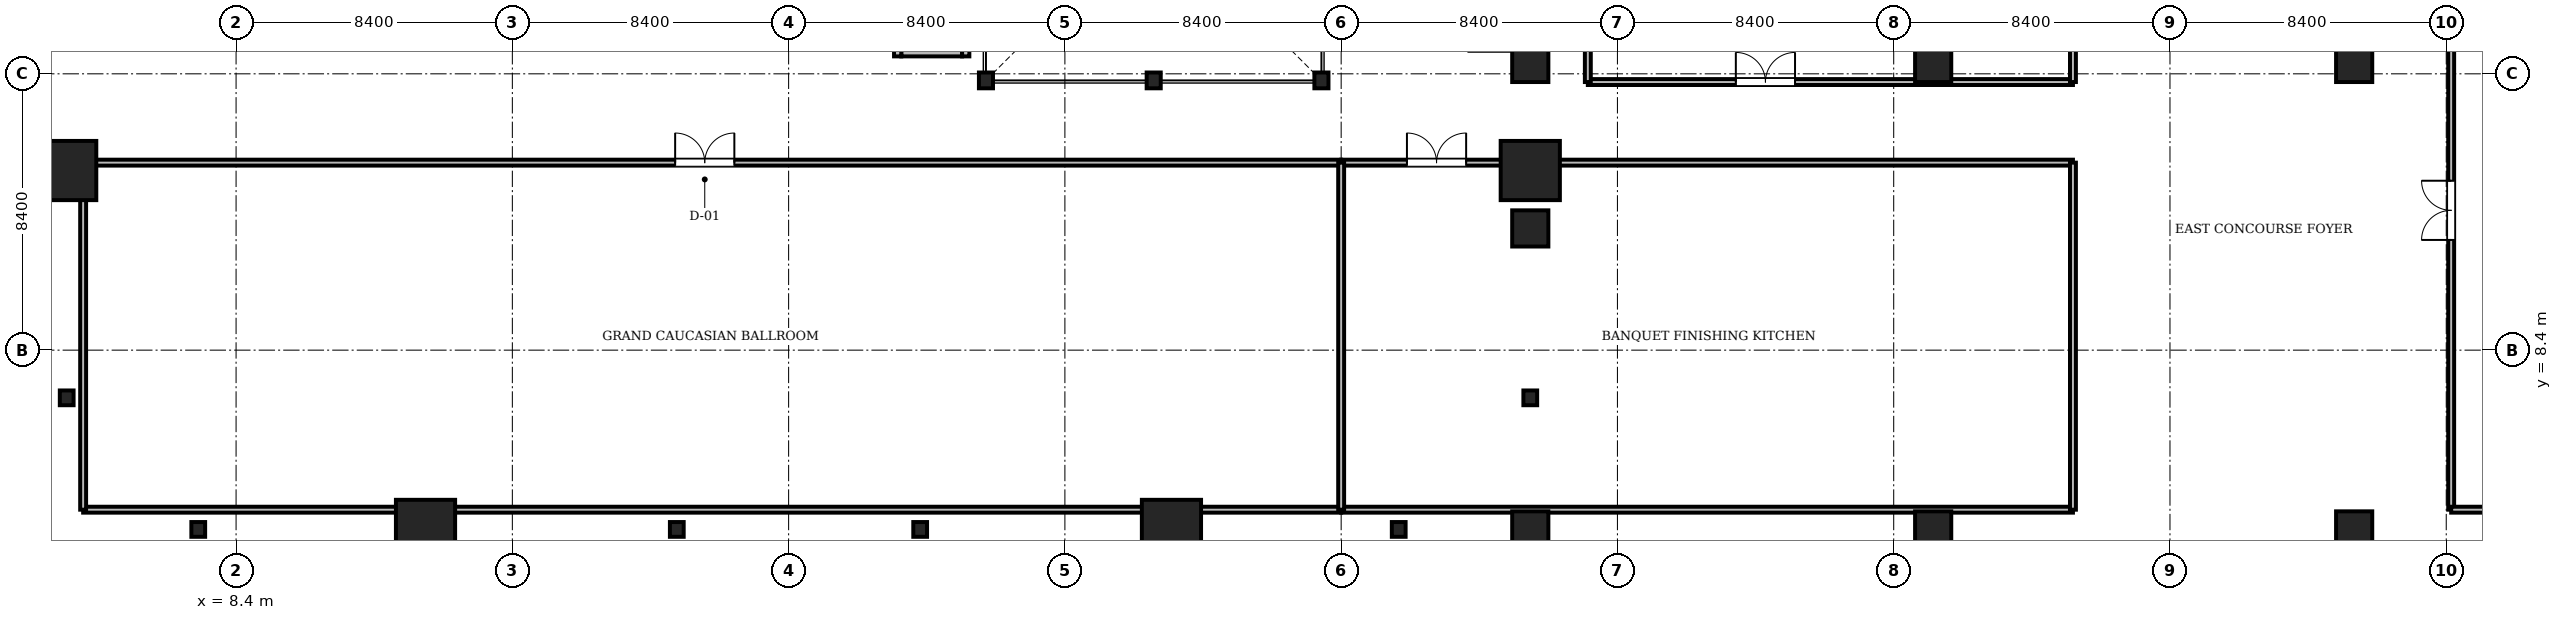
"""IFC4 building model, lengths in metres.
Left out: names, types, materials, properties, quantities, classifications, styles, units other than length and angle.
Written with IfcOpenShell. Run it as: python <this file> out.ifc"""

import sys

from ifc_helpers import new_model, si_unit, direction, frame, frame_2d, origin, origin_2d, place, context, subcontext, project, spatial, rectangle, i_section, extrude, source, transform, mapped, element, fill, save


model = new_model("IFC4")
c1 = context("Model", 3, precision=1e-05, world=origin(), true_north=direction((0.0, 1.0)))
c2 = subcontext(c1, "Body", "Model", "MODEL_VIEW")
j1 = project(units=[si_unit("LENGTHUNIT", "METRE"), si_unit("PLANEANGLEUNIT", "RADIAN")], contexts=[c1])
p1 = place(None, origin())
s1 = spatial("IfcSite", under=j1, at=p1, CompositionType="ELEMENT")
p2 = place(p1, origin())
s2 = spatial("IfcBuilding", under=s1, at=p2, CompositionType="ELEMENT")
p3 = place(p2, frame((0.0, 0.0, 17.0)))
s3 = spatial("IfcBuildingStorey", under=s2, at=p3, CompositionType="ELEMENT", Elevation=17.0)
m1 = source(origin(), c2, "Body", "SweptSolid", [
    extrude(i_section(OverallWidth=0.428, OverallDepth=0.481, WebThickness=0.04, FlangeThickness=0.063, FilletRadius=0.015, at=origin_2d()), origin(), (0.0, 0.0, 1.0), 5.08),
])
for number, where, z_axis, x_axis in (
    (1, (31.2, 16.6, 0.0), (0.0, 0.0, 1.0), (1.0, 0.0, 0.0)),
    (2, (36.3, 16.6, 0.0), (0.0, 0.0, 1.0), (1.0, 0.0, 0.0)),
    (3, (41.4, 16.6, 0.0), (0.0, 0.0, 1.0), (1.0, 0.0, 0.0)),
):
    element("IfcColumn", number, at=place(p3, frame(where, z_axis=z_axis, x_axis=x_axis)), inside=s3, PredefinedType="COLUMN", context=c2, shape_type="MappedRepresentation", body=[
        mapped(m1, transform((0.0, 0.0, 0.0), scale=1.0)),
    ])
m2 = source(origin(), c2, "Body", "SweptSolid", [
    extrude(rectangle(XDim=1.1, YDim=1.1, at=origin_2d()), origin(), (0.0, 0.0, 1.0), 5.08),
])
for number, where, z_axis, x_axis in (
    (4, (47.75, 2.95, 0.0), (0.0, 0.0, 1.0), (1.0, 0.0, 0.0)),
    (5, (60.0, 2.95, 0.0), (0.0, 0.0, 1.0), (1.0, 0.0, 0.0)),
    (6, (72.8, 2.95, 0.0), (0.0, 0.0, 1.0), (1.0, 0.0, 0.0)),
    (7, (47.75, 12.1, 0.0), (0.0, 0.0, 1.0), (1.0, 0.0, 0.0)),
    (8, (47.75, 17.1, 0.0), (0.0, 0.0, 1.0), (1.0, 0.0, 0.0)),
    (9, (60.0, 17.1, 0.0), (0.0, 0.0, 1.0), (1.0, 0.0, 0.0)),
    (10, (72.8, 17.1, 0.0), (0.0, 0.0, 1.0), (1.0, 0.0, 0.0)),
):
    element("IfcColumn", number, at=place(p3, frame(where, z_axis=z_axis, x_axis=x_axis)), inside=s3, PredefinedType="COLUMN", context=c2, shape_type="MappedRepresentation", body=[
        mapped(m2, transform((0.0, 0.0, 0.0), scale=1.0)),
    ])
m3 = source(origin(), c2, "Body", "SweptSolid", [
    extrude(rectangle(XDim=1.8, YDim=1.8, at=origin_2d()), origin(), (0.0, 0.0, 1.0), 5.08),
])
for number, where, z_axis, x_axis in (
    (11, (14.16, 2.95, 0.0), (0.0, 0.0, 1.0), (1.0, 0.0, 0.0)),
    (12, (36.84, 2.95, 0.0), (0.0, 0.0, 1.0), (1.0, 0.0, 0.0)),
    (13, (47.75, 13.86, 0.0), (0.0, 0.0, 1.0), (1.0, 0.0, 0.0)),
    (14, (3.25, 13.86, 0.0), (0.0, 0.0, 1.0), (1.0, 0.0, 0.0)),
):
    element("IfcColumn", number, at=place(p3, frame(where, z_axis=z_axis, x_axis=x_axis)), inside=s3, PredefinedType="COLUMN", context=c2, shape_type="MappedRepresentation", body=[
        mapped(m3, transform((0.0, 0.0, 0.0), scale=1.0)),
    ])
m4 = source(origin(), c2, "Body", "SweptSolid", [
    extrude(i_section(OverallWidth=0.419, OverallDepth=0.449, WebThickness=0.031, FlangeThickness=0.048, FilletRadius=0.015, at=origin_2d()), origin(), (0.0, 0.0, 1.0), 5.08),
])
for number, where, z_axis, x_axis in (
    (15, (7.25, 2.95, 0.0), (0.0, 0.0, 1.0), (1.0, 0.0, 0.0)),
    (16, (21.8, 2.95, 0.0), (0.0, 0.0, 1.0), (1.0, 0.0, 0.0)),
    (17, (29.2, 2.95, 0.0), (0.0, 0.0, 1.0), (1.0, 0.0, 0.0)),
    (18, (43.75, 2.95, 0.0), (0.0, 0.0, 1.0), (1.0, 0.0, 0.0)),
    (19, (47.75, 6.95, 0.0), (0.0, 0.0, 1.0), (1.0, 0.0, 0.0)),
    (20, (3.25, 6.95, 0.0), (0.0, 0.0, 1.0), (1.0, 0.0, 0.0)),
):
    element("IfcColumn", number, at=place(p3, frame(where, z_axis=z_axis, x_axis=x_axis)), inside=s3, PredefinedType="COLUMN", context=c2, shape_type="MappedRepresentation", body=[
        mapped(m4, transform((0.0, 0.0, 0.0), scale=1.0)),
    ])
m5 = source(origin(), c2, "Body", "SweptSolid", [
    extrude(rectangle(XDim=1.85, YDim=0.22, at=frame_2d((0.925, 0.0))), origin(), (0.0, 0.0, 1.0), 5.08),
])
p4 = place(p3, frame((28.625, 17.44, 0.0), z_axis=(0.0, 0.0, 1.0), x_axis=(1.0, 0.0, 0.0)))
e21 = element("IfcWall", 21, at=p4, inside=s3, PredefinedType="SOLIDWALL", context=c2, shape_type="MappedRepresentation", body=[
    mapped(m5, transform((0.0, 0.0, 0.0), scale=1.0)),
])
m6 = source(origin(), c2, "Body", "SweptSolid", [
    extrude(rectangle(XDim=2.54, YDim=0.22, at=frame_2d((1.27, 0.0))), origin(), (0.0, 0.0, 1.0), 5.08),
])
for number, where, z_axis, x_axis in (
    (22, (28.515, 17.33, 0.0), (0.0, 0.0, 1.0), (0.0, 1.0, 0.0)),
    (23, (30.585, 17.33, 0.0), (0.0, 0.0, 1.0), (0.0, 1.0, 0.0)),
):
    element("IfcWall", number, at=place(p3, frame(where, z_axis=z_axis, x_axis=x_axis)), inside=s3, PredefinedType="SOLIDWALL", context=c2, shape_type="MappedRepresentation", body=[
        mapped(m6, transform((0.0, 0.0, 0.0), scale=1.0)),
    ])
m7 = source(origin(), c2, "Body", "SweptSolid", [
    extrude(rectangle(XDim=38.25, YDim=0.18, at=frame_2d((19.125, 0.0))), origin(), (0.0, 0.0, 1.0), 5.08),
])
p5 = place(p3, frame((3.75, 14.1, 0.0), z_axis=(0.0, 0.0, 1.0), x_axis=(1.0, 0.0, 0.0)))
e24 = element("IfcWall", 24, at=p5, inside=s3, PredefinedType="PARTITIONING", context=c2, shape_type="MappedRepresentation", body=[
    mapped(m7, transform((0.0, 0.0, 0.0), scale=1.0)),
])
m8 = source(origin(), c2, "Body", "SweptSolid", [
    extrude(rectangle(XDim=1.8, YDim=2.4, at=frame_2d((0.9, 1.2))), frame((0.0, 0.1, 0.0), z_axis=(0.0, -1.0, 0.0), x_axis=(1.0, 0.0, 0.0)), (0.0, 0.0, 1.0), 0.2),
])
p6 = place(p5, frame((18.0, 0.0, 0.0)))
e25 = element("IfcOpeningElement", 25, at=p6, cuts=e24, PredefinedType="OPENING", context=c2, shape_type="MappedRepresentation", body=[
    mapped(m8, transform((0.0, 0.0, 0.0), scale=1.0)),
])
m9 = source(origin(), c2, "Body", "SweptSolid", [
    extrude(rectangle(XDim=25.7, YDim=0.18, at=frame_2d((12.85, 0.0))), origin(), (0.0, 0.0, 1.0), 4.548),
])
p7 = place(p3, frame((75.75, 3.55, 0.0), z_axis=(0.0, 0.0, 1.0), x_axis=(0.0, 1.0, 0.0)))
e26 = element("IfcWall", 26, at=p7, inside=s3, PredefinedType="PARTITIONING", context=c2, shape_type="MappedRepresentation", body=[
    mapped(m9, transform((0.0, 0.0, 0.0), scale=1.0)),
])
p8 = place(p7, frame((8.2, 0.0, 0.0)))
e27 = element("IfcOpeningElement", 27, at=p8, cuts=e26, PredefinedType="OPENING", context=c2, shape_type="MappedRepresentation", body=[
    mapped(m8, transform((0.0, 0.0, 0.0), scale=1.0)),
])
m10 = source(origin(), c2, "Body", "SweptSolid", [
    extrude(rectangle(XDim=22.25, YDim=0.18, at=frame_2d((11.125, 0.0))), origin(), (0.0, 0.0, 1.0), 4.472),
])
p9 = place(p3, frame((42.0, 14.1, 0.0), z_axis=(0.0, 0.0, 1.0), x_axis=(1.0, 0.0, 0.0)))
e28 = element("IfcWall", 28, at=p9, inside=s3, PredefinedType="PARTITIONING", context=c2, shape_type="MappedRepresentation", body=[
    mapped(m10, transform((0.0, 0.0, 0.0), scale=1.0)),
])
p10 = place(p9, frame((2.0, 0.0, 0.0)))
e29 = element("IfcOpeningElement", 29, at=p10, cuts=e28, PredefinedType="OPENING", context=c2, shape_type="MappedRepresentation", body=[
    mapped(m8, transform((0.0, 0.0, 0.0), scale=1.0)),
])
m11 = source(origin(), c2, "Body", "SweptSolid", [
    extrude(rectangle(XDim=14.75, YDim=0.18, at=frame_2d((7.375, 0.0))), origin(), (0.0, 0.0, 1.0), 4.472),
])
p11 = place(p3, frame((49.5, 16.55, 0.0), z_axis=(0.0, 0.0, 1.0), x_axis=(1.0, 0.0, 0.0)))
e30 = element("IfcWall", 30, at=p11, inside=s3, PredefinedType="PARTITIONING", context=c2, shape_type="MappedRepresentation", body=[
    mapped(m11, transform((0.0, 0.0, 0.0), scale=1.0)),
])
p12 = place(p11, frame((4.5, 0.0, 0.0)))
e31 = element("IfcOpeningElement", 31, at=p12, cuts=e30, PredefinedType="OPENING", context=c2, shape_type="MappedRepresentation", body=[
    mapped(m8, transform((0.0, 0.0, 0.0), scale=1.0)),
])
p13 = place(p3, frame((3.75, 3.55, 0.0), z_axis=(0.0, 0.0, 1.0), x_axis=(1.0, 0.0, 0.0)))
e32 = element("IfcWall", 32, at=p13, inside=s3, PredefinedType="PARTITIONING", context=c2, shape_type="MappedRepresentation", body=[
    mapped(m7, transform((0.0, 0.0, 0.0), scale=1.0)),
])
p14 = place(p3, frame((42.0, 3.55, 0.0), z_axis=(0.0, 0.0, 1.0), x_axis=(1.0, 0.0, 0.0)))
e33 = element("IfcWall", 33, at=p14, inside=s3, PredefinedType="PARTITIONING", context=c2, shape_type="MappedRepresentation", body=[
    mapped(m10, transform((0.0, 0.0, 0.0), scale=1.0)),
])
m12 = source(origin(), c2, "Body", "SweptSolid", [
    extrude(rectangle(XDim=11.75, YDim=0.18, at=frame_2d((5.875, 0.0))), origin(), (0.0, 0.0, 1.0), 4.548),
])
for number, where, z_axis, x_axis in (
    (34, (49.5, 16.55, 0.0), (0.0, 0.0, 1.0), (0.0, 1.0, 0.0)),
    (35, (64.25, 16.55, 0.0), (0.0, 0.0, 1.0), (0.0, 1.0, 0.0)),
):
    element("IfcWall", number, at=place(p3, frame(where, z_axis=z_axis, x_axis=x_axis)), inside=s3, PredefinedType="PARTITIONING", context=c2, shape_type="MappedRepresentation", body=[
        mapped(m12, transform((0.0, 0.0, 0.0), scale=1.0)),
    ])
m13 = source(origin(), c2, "Body", "SweptSolid", [
    extrude(rectangle(XDim=10.55, YDim=0.18, at=frame_2d((5.275, 0.0))), origin(), (0.0, 0.0, 1.0), 5.08),
])
for number, where, z_axis, x_axis in (
    (36, (3.75, 3.55, 0.0), (0.0, 0.0, 1.0), (0.0, 1.0, 0.0)),
    (37, (42.0, 3.55, 0.0), (0.0, 0.0, 1.0), (0.0, 1.0, 0.0)),
):
    element("IfcWall", number, at=place(p3, frame(where, z_axis=z_axis, x_axis=x_axis)), inside=s3, PredefinedType="PARTITIONING", context=c2, shape_type="MappedRepresentation", body=[
        mapped(m13, transform((0.0, 0.0, 0.0), scale=1.0)),
    ])
m14 = source(origin(), c2, "Body", "SweptSolid", [
    extrude(rectangle(XDim=10.55, YDim=0.18, at=frame_2d((5.275, 0.0))), origin(), (0.0, 0.0, 1.0), 4.672),
])
p15 = place(p3, frame((64.25, 3.55, 0.0), z_axis=(0.0, 0.0, 1.0), x_axis=(0.0, 1.0, 0.0)))
e38 = element("IfcWall", 38, at=p15, inside=s3, PredefinedType="PARTITIONING", context=c2, shape_type="MappedRepresentation", body=[
    mapped(m14, transform((0.0, 0.0, 0.0), scale=1.0)),
])
m15 = source(origin(), c2, "Body", "SweptSolid", [
    extrude(rectangle(XDim=6.5, YDim=0.18, at=frame_2d((3.25, 0.0))), origin(), (0.0, 0.0, 1.0), 4.472),
])
p16 = place(p3, frame((75.75, 3.55, 0.0), z_axis=(0.0, 0.0, 1.0), x_axis=(1.0, 0.0, 0.0)))
e39 = element("IfcWall", 39, at=p16, inside=s3, PredefinedType="PARTITIONING", context=c2, shape_type="MappedRepresentation", body=[
    mapped(m15, transform((0.0, 0.0, 0.0), scale=1.0)),
])
m16 = source(origin(), c2, "Body", "SweptSolid", [
    extrude(rectangle(XDim=1.8, YDim=2.4, at=frame_2d((0.9, 1.2))), frame((0.0, 0.025, 0.0), z_axis=(0.0, -1.0, 0.0), x_axis=(1.0, 0.0, 0.0)), (0.0, 0.0, 1.0), 0.05),
])
p17 = place(p6, origin())
e40 = element("IfcDoor", 40, at=p17, inside=s3, OperationType="DOUBLE_DOOR_SINGLE_SWING", PredefinedType="DOOR", context=c2, shape_type="MappedRepresentation", body=[
    mapped(m16, transform((0.0, 0.0, 0.0), scale=1.0)),
])
fill(e25, e40)
p18 = place(p8, origin())
e41 = element("IfcDoor", 41, at=p18, inside=s3, OperationType="DOUBLE_DOOR_SINGLE_SWING", PredefinedType="DOOR", context=c2, shape_type="MappedRepresentation", body=[
    mapped(m16, transform((0.0, 0.0, 0.0), scale=1.0)),
])
fill(e27, e41)
p19 = place(p10, origin())
e42 = element("IfcDoor", 42, at=p19, inside=s3, OperationType="DOUBLE_DOOR_SINGLE_SWING", PredefinedType="DOOR", context=c2, shape_type="MappedRepresentation", body=[
    mapped(m16, transform((0.0, 0.0, 0.0), scale=1.0)),
])
fill(e29, e42)
p20 = place(p12, origin())
e43 = element("IfcDoor", 43, at=p20, inside=s3, OperationType="DOUBLE_DOOR_SINGLE_SWING", PredefinedType="DOOR", context=c2, shape_type="MappedRepresentation", body=[
    mapped(m16, transform((0.0, 0.0, 0.0), scale=1.0)),
])
fill(e31, e43)
save(model, sys.argv[1])
